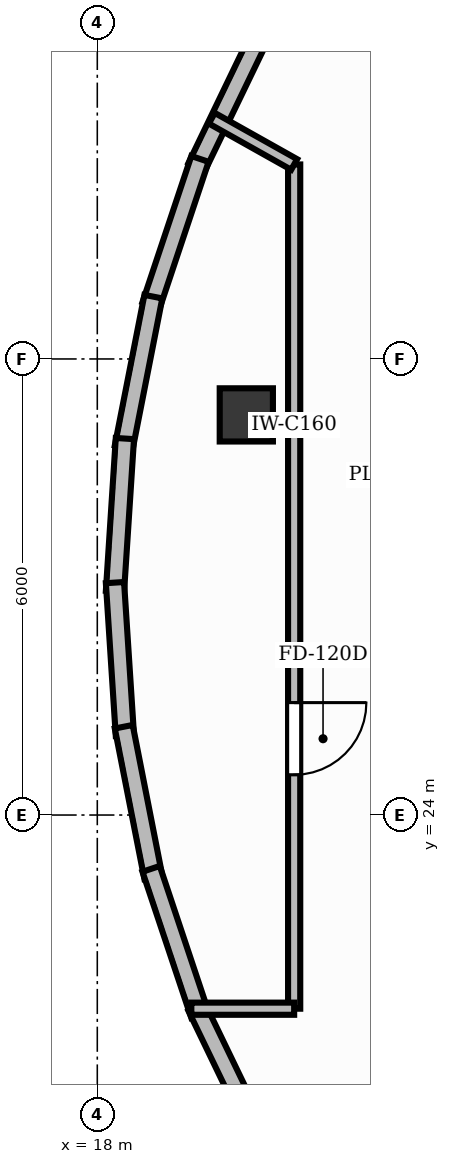
"""IFC4 building model, lengths in metres.
Left out: names, types, materials, properties, quantities, classifications, styles, units other than length and angle.
Written with IfcOpenShell. Run it as: python <this file> out.ifc"""

import sys

from ifc_helpers import new_model, si_unit, direction, frame, frame_2d, origin, origin_2d, place, context, subcontext, project, spatial, rectangle, extrude, element, fill, save


model = new_model("IFC4")
c1 = context("Model", 3, precision=1e-05, world=origin(), true_north=direction((0.0, 1.0)))
c2 = subcontext(c1, "Body", "Model", "MODEL_VIEW")
j1 = project(units=[si_unit("LENGTHUNIT", "METRE"), si_unit("PLANEANGLEUNIT", "RADIAN")], contexts=[c1])
p1 = place(None, origin())
s1 = spatial("IfcSite", under=j1, at=p1, CompositionType="ELEMENT")
p2 = place(p1, origin())
s2 = spatial("IfcBuilding", under=s1, at=p2, CompositionType="ELEMENT")
p3 = place(p2, frame((0.0, 0.0, 339.6)))
s3 = spatial("IfcBuildingStorey", under=s2, at=p3, CompositionType="ELEMENT", Elevation=339.6)
p4 = place(p3, frame((19.96, 29.264, -0.0), z_axis=(0.0, 0.0, 1.0), x_axis=(0.0, 1.0, 0.0)))
e1 = element("IfcColumn", 1, at=p4, inside=s3, PredefinedType="COLUMN", context=c2, shape_type="SweptSolid", body=[
    extrude(rectangle(XDim=0.7, YDim=0.7, at=origin_2d()), origin(), (0.0, 0.0, 1.0), 3.921),
])
p5 = place(p3, frame((20.194, 34.362, 0.0), z_axis=(0.0, 0.0, 1.0), x_axis=(-0.43443443496, -0.90070345937, 0.0)))
e2 = element("IfcWall", 2, at=p5, inside=s3, PredefinedType="STANDARD", context=c2, shape_type="SweptSolid", body=[
    extrude(rectangle(XDim=2.04, YDim=0.24, at=frame_2d((1.02, 0.0))), origin(), (0.0, 0.0, 1.0), 3.92),
])
p6 = place(p3, frame((19.351, 32.632, 0.0), z_axis=(0.0, 0.0, 1.0), x_axis=(-0.31687782103, -0.948466365529, 0.0)))
e3 = element("IfcWall", 3, at=p6, inside=s3, PredefinedType="STANDARD", context=c2, shape_type="SweptSolid", body=[
    extrude(rectangle(XDim=2.028, YDim=0.24, at=frame_2d((1.014, 0.0))), origin(), (0.0, 0.0, 1.0), 3.92),
])
p7 = place(p3, frame((18.738, 30.82, 0.0), z_axis=(0.0, 0.0, 1.0), x_axis=(-0.19285964679, -0.981226353417, 0.0)))
e4 = element("IfcWall", 4, at=p7, inside=s3, PredefinedType="STANDARD", context=c2, shape_type="SweptSolid", body=[
    extrude(rectangle(XDim=2.019, YDim=0.24, at=frame_2d((1.01, 0.0))), origin(), (0.0, 0.0, 1.0), 3.92),
])
for number, where, z_axis, x_axis in (
    (5, (18.363, 28.953, 0.0), (0.0, 0.0, 1.0), (-0.065, -0.998, 0.0)),
    (6, (18.232, 27.058, 0.0), (0.0, 0.0, 1.0), (0.065, -0.998, 0.0)),
):
    element("IfcWall", number, at=place(p3, frame(where, z_axis=z_axis, x_axis=x_axis)), inside=s3, PredefinedType="STANDARD", context=c2, shape_type="SweptSolid", body=[
        extrude(rectangle(XDim=2.015, YDim=0.24, at=frame_2d((1.007, 0.0))), origin(), (0.0, 0.0, 1.0), 3.92),
    ])
p8 = place(p3, frame((18.348, 25.162, 0.0), z_axis=(0.0, 0.0, 1.0), x_axis=(0.19285964679, -0.981226353417, 0.0)))
e7 = element("IfcWall", 7, at=p8, inside=s3, PredefinedType="STANDARD", context=c2, shape_type="SweptSolid", body=[
    extrude(rectangle(XDim=2.019, YDim=0.24, at=frame_2d((1.01, 0.0))), origin(), (0.0, 0.0, 1.0), 3.92),
])
p9 = place(p3, frame((18.708, 23.292, 0.0), z_axis=(0.0, 0.0, 1.0), x_axis=(0.31687782103, -0.948466365529, 0.0)))
e8 = element("IfcWall", 8, at=p9, inside=s3, PredefinedType="STANDARD", context=c2, shape_type="SweptSolid", body=[
    extrude(rectangle(XDim=2.028, YDim=0.24, at=frame_2d((1.014, 0.0))), origin(), (0.0, 0.0, 1.0), 3.92),
])
p10 = place(p3, frame((19.307, 21.475, 0.0), z_axis=(0.0, 0.0, 1.0), x_axis=(0.43443443496, -0.90070345937, 0.0)))
e9 = element("IfcWall", 9, at=p10, inside=s3, PredefinedType="STANDARD", context=c2, shape_type="SweptSolid", body=[
    extrude(rectangle(XDim=2.04, YDim=0.24, at=frame_2d((1.02, 0.0))), origin(), (0.0, 0.0, 1.0), 3.92),
])
p11 = place(p3, frame((20.59, 32.559, 0.0), z_axis=(0.0, 0.0, 1.0), x_axis=(0.0, -1.0, 0.0)))
e10 = element("IfcWall", 10, at=p11, inside=s3, PredefinedType="PARTITIONING", context=c2, shape_type="SweptSolid", body=[
    extrude(rectangle(XDim=11.107, YDim=0.16, at=frame_2d((5.553, 0.0))), origin(), (0.0, 0.0, 1.0), 2.63),
])
p12 = place(p11, frame((7.08, 0.0, 0.0)))
e11 = element("IfcOpeningElement", 11, at=p12, cuts=e10, PredefinedType="OPENING", context=c2, shape_type="SweptSolid", body=[
    extrude(rectangle(XDim=0.95, YDim=2.15, at=frame_2d((0.475, 1.075))), frame((0.0, 0.095, 0.0), z_axis=(0.0, -1.0, 0.0), x_axis=(1.0, 0.0, 0.0)), (0.0, 0.0, 1.0), 0.19),
])
p13 = place(p3, frame((19.507, 33.167, 0.0), z_axis=(0.0, 0.0, 1.0), x_axis=(0.872026455492, -0.489458742819, 0.0)))
e12 = element("IfcWall", 12, at=p13, inside=s3, PredefinedType="PARTITIONING", context=c2, shape_type="SweptSolid", body=[
    extrude(rectangle(XDim=1.242, YDim=0.16, at=frame_2d((0.621, 0.0))), origin(), (0.0, 0.0, 1.0), 2.63),
])
p14 = place(p3, frame((20.59, 21.452, 0.0), z_axis=(0.0, 0.0, 1.0), x_axis=(-1.0, 0.0, 0.0)))
e13 = element("IfcWall", 13, at=p14, inside=s3, PredefinedType="PARTITIONING", context=c2, shape_type="SweptSolid", body=[
    extrude(rectangle(XDim=1.353, YDim=0.16, at=frame_2d((0.676, 0.0))), origin(), (0.0, 0.0, 1.0), 2.63),
])
p15 = place(p12, origin())
e14 = element("IfcDoor", 14, at=p15, inside=s3, OperationType="SINGLE_SWING_LEFT", PredefinedType="DOOR", context=c2, shape_type="SweptSolid", body=[
    extrude(rectangle(XDim=0.95, YDim=2.15, at=frame_2d((0.475, 1.075))), frame((0.0, 0.025, 0.0), z_axis=(0.0, -1.0, 0.0), x_axis=(1.0, 0.0, 0.0)), (0.0, 0.0, 1.0), 0.05),
])
fill(e11, e14)
save(model, sys.argv[1])
